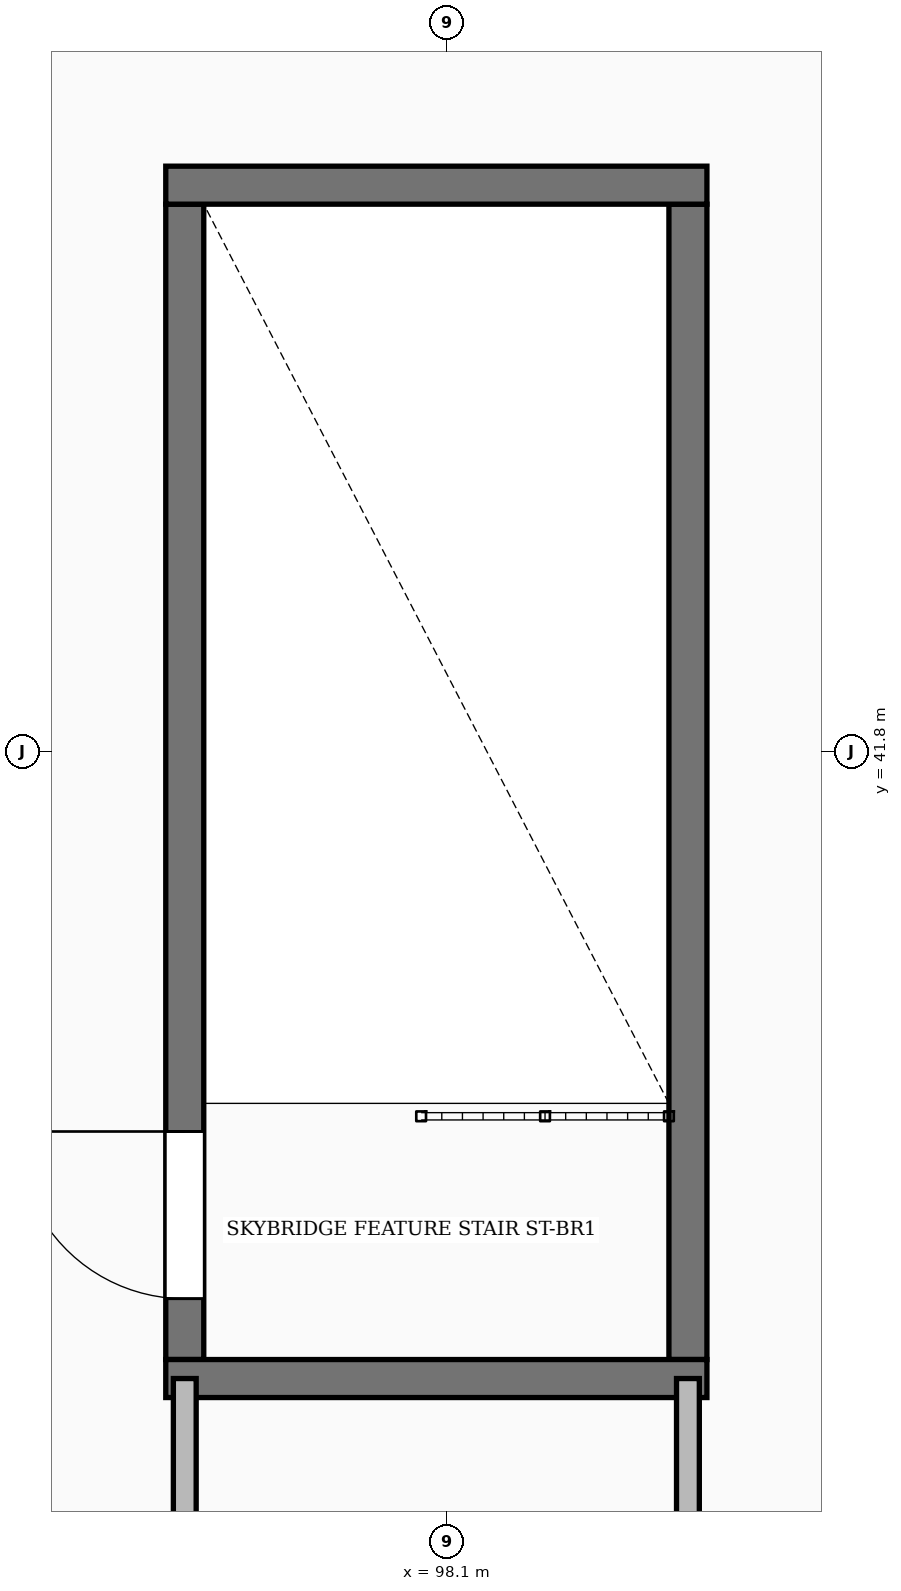
"""IFC4 building model, lengths in metres.
Left out: names, types, materials, properties, quantities, classifications, styles, units other than length and angle.
Written with IfcOpenShell. Run it as: python <this file> out.ifc"""

import sys

from ifc_helpers import new_model, si_unit, direction, frame, frame_2d, origin, place, context, subcontext, project, spatial, rectangle, extrude, element, fill, save


model = new_model("IFC4")
c1 = context("Model", 3, precision=1e-05, world=origin(), true_north=direction((0.0, 1.0)))
c2 = subcontext(c1, "Body", "Model", "MODEL_VIEW")
j1 = project(units=[si_unit("LENGTHUNIT", "METRE"), si_unit("PLANEANGLEUNIT", "RADIAN")], contexts=[c1])
p1 = place(None, origin())
s1 = spatial("IfcSite", under=j1, at=p1, CompositionType="ELEMENT")
p2 = place(p1, origin())
s2 = spatial("IfcBuilding", under=s1, at=p2, CompositionType="ELEMENT")
p3 = place(p2, frame((0.0, 0.0, 153.7)))
s3 = spatial("IfcBuildingStorey", under=s2, at=p3, CompositionType="ELEMENT", Elevation=153.7)
p4 = place(p3, frame((96.375, 37.8, 0.0), z_axis=(0.0, 0.0, 1.0), x_axis=(0.0, 1.0, 0.0)))
e1 = element("IfcWall", 1, at=p4, inside=s3, PredefinedType="SHEAR", context=c2, shape_type="SweptSolid", body=[
    extrude(rectangle(XDim=7.6, YDim=0.25, at=frame_2d((3.8, 0.0))), origin(), (0.0, 0.0, 1.0), 3.6),
])
p5 = place(p4, frame((0.4, 0.0, 0.0)))
e2 = element("IfcOpeningElement", 2, at=p5, cuts=e1, PredefinedType="OPENING", context=c2, shape_type="SweptSolid", body=[
    extrude(rectangle(XDim=1.1, YDim=2.1, at=frame_2d((0.55, 1.05))), frame((0.0, 0.135, 0.0), z_axis=(0.0, -1.0, 0.0), x_axis=(1.0, 0.0, 0.0)), (0.0, 0.0, 1.0), 0.27),
])
p6 = place(p3, frame((99.685, 37.8, 0.0), z_axis=(0.0, 0.0, 1.0), x_axis=(0.0, 1.0, 0.0)))
e3 = element("IfcWall", 3, at=p6, inside=s3, PredefinedType="SHEAR", context=c2, shape_type="SweptSolid", body=[
    extrude(rectangle(XDim=7.6, YDim=0.25, at=frame_2d((3.8, 0.0))), origin(), (0.0, 0.0, 1.0), 3.6),
])
for number, where, z_axis, x_axis in (
    (4, (96.25, 37.675, 0.0), (0.0, 0.0, 1.0), (1.0, 0.0, 0.0)),
    (5, (96.25, 45.525, 0.0), (0.0, 0.0, 1.0), (1.0, 0.0, 0.0)),
):
    element("IfcWall", number, at=place(p3, frame(where, z_axis=z_axis, x_axis=x_axis)), inside=s3, PredefinedType="SHEAR", context=c2, shape_type="SweptSolid", body=[
        extrude(rectangle(XDim=3.56, YDim=0.25, at=frame_2d((1.78, 0.0))), origin(), (0.0, 0.0, 1.0), 3.6),
    ])
p7 = place(p3, frame((96.375, 32.95, 0.0), z_axis=(0.0, 0.0, 1.0), x_axis=(0.0, 1.0, 0.0)))
e6 = element("IfcWall", 6, at=p7, inside=s3, PredefinedType="PARTITIONING", context=c2, shape_type="SweptSolid", body=[
    extrude(rectangle(XDim=4.725, YDim=0.15, at=frame_2d((2.363, 0.0))), origin(), (0.0, 0.0, 1.0), 2.394),
])
p8 = place(p7, frame((1.6, 0.0, 0.0)))
e7 = element("IfcOpeningElement", 7, at=p8, cuts=e6, PredefinedType="OPENING", context=c2, shape_type="SweptSolid", body=[
    extrude(rectangle(XDim=0.96, YDim=2.1, at=frame_2d((0.48, 1.05))), frame((0.0, 0.085, 0.0), z_axis=(0.0, -1.0, 0.0), x_axis=(1.0, 0.0, 0.0)), (0.0, 0.0, 1.0), 0.17),
])
p9 = place(p3, frame((99.685, 32.95, 0.0), z_axis=(0.0, 0.0, 1.0), x_axis=(0.0, 1.0, 0.0)))
e8 = element("IfcWall", 8, at=p9, inside=s3, PredefinedType="PARTITIONING", context=c2, shape_type="SweptSolid", body=[
    extrude(rectangle(XDim=4.725, YDim=0.15, at=frame_2d((2.363, 0.0))), origin(), (0.0, 0.0, 1.0), 2.394),
])
p10 = place(p5, origin())
e9 = element("IfcDoor", 9, at=p10, inside=s3, OperationType="SINGLE_SWING_RIGHT", PredefinedType="DOOR", context=c2, shape_type="SweptSolid", body=[
    extrude(rectangle(XDim=1.1, YDim=2.1, at=frame_2d((0.55, 1.05))), frame((0.0, 0.025, 0.0), z_axis=(0.0, -1.0, 0.0), x_axis=(1.0, 0.0, 0.0)), (0.0, 0.0, 1.0), 0.05),
])
fill(e2, e9)
save(model, sys.argv[1])
